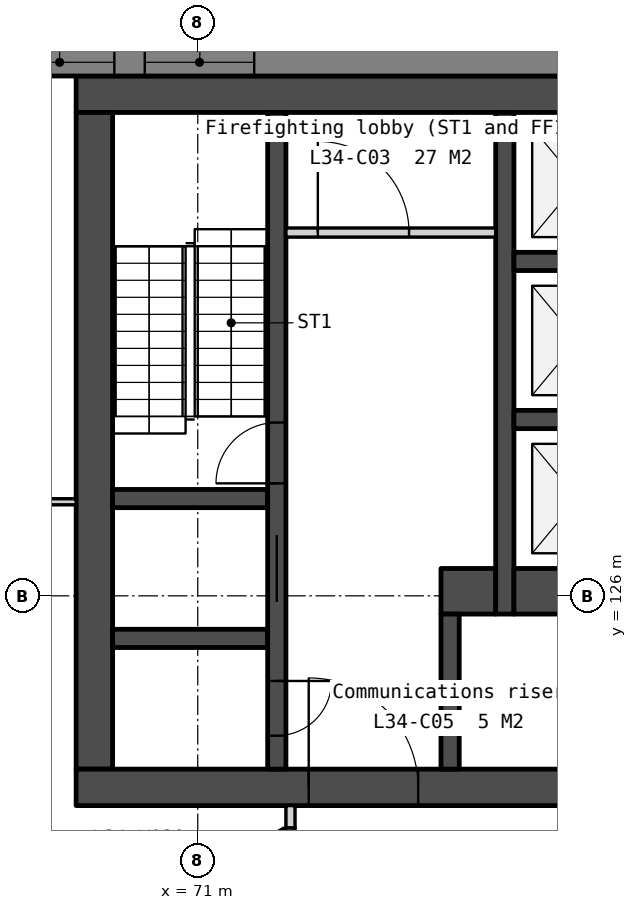
"""IFC4 building model, lengths in metres.
Left out: names, types, materials, properties, quantities, classifications, styles, units other than length and angle.
Written with IfcOpenShell. Run it as: python <this file> out.ifc"""

import sys

from ifc_helpers import new_model, si_unit, direction, frame, frame_2d, origin, place, context, subcontext, project, spatial, polyline, rectangle, outline, extrude, element, fill, save


model = new_model("IFC4")
c1 = context("Model", 3, precision=1e-05, world=origin(), true_north=direction((0.0, 1.0)))
c2 = subcontext(c1, "Body", "Model", "MODEL_VIEW")
j1 = project(units=[si_unit("LENGTHUNIT", "METRE"), si_unit("PLANEANGLEUNIT", "RADIAN")], contexts=[c1])
p1 = place(None, origin())
s1 = spatial("IfcSite", under=j1, at=p1, CompositionType="ELEMENT")
p2 = place(p1, origin())
s2 = spatial("IfcBuilding", under=s1, at=p2, CompositionType="ELEMENT")
p3 = place(p2, frame((0.0, 0.0, 136.4)))
s3 = spatial("IfcBuildingStorey", under=s2, at=p3, CompositionType="ELEMENT", Elevation=136.4)
p4 = place(p3, frame((69.0, 134.25, 0.0), z_axis=(0.0, 0.0, 1.0), x_axis=(1.0, 0.0, 0.0)))
e1 = element("IfcWall", 1, at=p4, inside=s3, PredefinedType="SOLIDWALL", context=c2, shape_type="SweptSolid", body=[
    extrude(rectangle(XDim=22.0, YDim=0.6, at=frame_2d((11.0, 0.0))), origin(), (0.0, 0.0, 1.0), 3.75),
])
p5 = place(p3, frame((69.3, 133.95, 0.0), z_axis=(0.0, 0.0, 1.0), x_axis=(0.0, -1.0, 0.0)))
e2 = element("IfcWall", 2, at=p5, inside=s3, PredefinedType="SOLIDWALL", context=c2, shape_type="SweptSolid", body=[
    extrude(rectangle(XDim=10.8, YDim=0.6, at=frame_2d((5.4, 0.0))), origin(), (0.0, 0.0, 1.0), 3.75),
])
p6 = place(p3, frame((69.0, 122.85, 0.0), z_axis=(0.0, 0.0, 1.0), x_axis=(1.0, 0.0, 0.0)))
e3 = element("IfcWall", 3, at=p6, inside=s3, PredefinedType="SOLIDWALL", context=c2, shape_type="SweptSolid", body=[
    extrude(rectangle(XDim=22.0, YDim=0.6, at=frame_2d((11.0, 0.0))), origin(), (0.0, 0.0, 1.0), 3.75),
])
p7 = place(p6, frame((16.375, 0.0, 0.0)))
e4 = element("IfcOpeningElement", 4, at=p7, cuts=e3, PredefinedType="OPENING", context=c2, shape_type="SweptSolid", body=[
    extrude(rectangle(XDim=1.8, YDim=2.1, at=frame_2d((0.9, 1.05))), frame((0.0, 0.31, 0.0), z_axis=(0.0, -1.0, 0.0), x_axis=(1.0, 0.0, 0.0)), (0.0, 0.0, 1.0), 0.62),
])
p8 = place(p6, frame((3.825, 0.0, 0.0)))
e5 = element("IfcOpeningElement", 5, at=p8, cuts=e3, PredefinedType="OPENING", context=c2, shape_type="SweptSolid", body=[
    extrude(rectangle(XDim=1.8, YDim=2.1, at=frame_2d((0.9, 1.05))), frame((0.0, 0.31, 0.0), z_axis=(0.0, -1.0, 0.0), x_axis=(1.0, 0.0, 0.0)), (0.0, 0.0, 1.0), 0.62),
])
p9 = place(p6, frame((12.85, 0.0, 0.0)))
e6 = element("IfcOpeningElement", 6, at=p9, cuts=e3, PredefinedType="OPENING", context=c2, shape_type="SweptSolid", body=[
    extrude(rectangle(XDim=1.5, YDim=2.1, at=frame_2d((0.75, 1.05))), frame((0.0, 0.31, 0.0), z_axis=(0.0, -1.0, 0.0), x_axis=(1.0, 0.0, 0.0)), (0.0, 0.0, 1.0), 0.62),
])
for number, where, z_axis, x_axis in (
    (7, (69.6, 127.6, 0.0), (0.0, 0.0, 1.0), (1.0, 0.0, 0.0)),
    (8, (69.6, 125.3, 0.0), (0.0, 0.0, 1.0), (1.0, 0.0, 0.0)),
):
    element("IfcWall", number, at=place(p3, frame(where, z_axis=z_axis, x_axis=x_axis)), inside=s3, PredefinedType="SOLIDWALL", context=c2, shape_type="SweptSolid", body=[
        extrude(rectangle(XDim=2.55, YDim=0.3, at=frame_2d((1.275, 0.0))), origin(), (0.0, 0.0, 1.0), 3.75),
    ])
p10 = place(p3, frame((72.3, 133.95, 0.0), z_axis=(0.0, 0.0, 1.0), x_axis=(0.0, -1.0, 0.0)))
e9 = element("IfcWall", 9, at=p10, inside=s3, PredefinedType="SOLIDWALL", context=c2, shape_type="SweptSolid", body=[
    extrude(rectangle(XDim=10.8, YDim=0.3, at=frame_2d((5.4, 0.0))), origin(), (0.0, 0.0, 1.0), 3.75),
])
p11 = place(p10, frame((6.95, 0.0, 0.0)))
e10 = element("IfcOpeningElement", 10, at=p11, cuts=e9, PredefinedType="OPENING", context=c2, shape_type="SweptSolid", body=[
    extrude(rectangle(XDim=1.1, YDim=2.1, at=frame_2d((0.55, 1.05))), frame((0.0, 0.16, 0.0), z_axis=(0.0, -1.0, 0.0), x_axis=(1.0, 0.0, 0.0)), (0.0, 0.0, 1.0), 0.32),
])
p12 = place(p10, frame((9.35, 0.0, 0.0)))
e11 = element("IfcOpeningElement", 11, at=p12, cuts=e9, PredefinedType="OPENING", context=c2, shape_type="SweptSolid", body=[
    extrude(rectangle(XDim=0.9, YDim=2.1, at=frame_2d((0.45, 1.05))), frame((0.0, 0.16, 0.0), z_axis=(0.0, -1.0, 0.0), x_axis=(1.0, 0.0, 0.0)), (0.0, 0.0, 1.0), 0.32),
])
p13 = place(p10, frame((5.1, 0.0, 0.0)))
e12 = element("IfcOpeningElement", 12, at=p13, cuts=e9, PredefinedType="OPENING", context=c2, shape_type="SweptSolid", body=[
    extrude(rectangle(XDim=1.0, YDim=2.1, at=frame_2d((0.5, 1.05))), frame((0.0, 0.16, 0.0), z_axis=(0.0, -1.0, 0.0), x_axis=(1.0, 0.0, 0.0)), (0.0, 0.0, 1.0), 0.32),
])
p14 = place(p3, frame((72.45, 131.975, 0.0), z_axis=(0.0, 0.0, 1.0), x_axis=(1.0, 0.0, 0.0)))
e13 = element("IfcWall", 13, at=p14, inside=s3, PredefinedType="PARTITIONING", context=c2, shape_type="SweptSolid", body=[
    extrude(rectangle(XDim=3.45, YDim=0.15, at=frame_2d((1.725, 0.0))), origin(), (0.0, 0.0, 1.0), 3.75),
])
p15 = place(p14, frame((0.525, 0.0, 0.0)))
e14 = element("IfcOpeningElement", 14, at=p15, cuts=e13, PredefinedType="OPENING", context=c2, shape_type="SweptSolid", body=[
    extrude(rectangle(XDim=1.5, YDim=2.1, at=frame_2d((0.75, 1.05))), frame((0.0, 0.085, 0.0), z_axis=(0.0, -1.0, 0.0), x_axis=(1.0, 0.0, 0.0)), (0.0, 0.0, 1.0), 0.17),
])
p16 = place(p3, frame((75.0, 126.075, 0.0), z_axis=(0.0, 0.0, 1.0), x_axis=(1.0, 0.0, 0.0)))
e15 = element("IfcWall", 15, at=p16, inside=s3, PredefinedType="SOLIDWALL", context=c2, shape_type="SweptSolid", body=[
    extrude(rectangle(XDim=0.9, YDim=0.75, at=frame_2d((0.45, 0.0))), origin(), (0.0, 0.0, 1.0), 3.75),
])
p17 = place(p3, frame((75.15, 125.7, 0.0), z_axis=(0.0, 0.0, 1.0), x_axis=(0.0, -1.0, 0.0)))
e16 = element("IfcWall", 16, at=p17, inside=s3, PredefinedType="SOLIDWALL", context=c2, shape_type="SweptSolid", body=[
    extrude(rectangle(XDim=2.55, YDim=0.3, at=frame_2d((1.275, 0.0))), origin(), (0.0, 0.0, 1.0), 3.75),
])
p18 = place(p3, frame((76.05, 133.95, 0.0), z_axis=(0.0, 0.0, 1.0), x_axis=(0.0, -1.0, 0.0)))
e17 = element("IfcWall", 17, at=p18, inside=s3, PredefinedType="SOLIDWALL", context=c2, shape_type="SweptSolid", body=[
    extrude(rectangle(XDim=8.25, YDim=0.3, at=frame_2d((4.125, 0.0))), origin(), (0.0, 0.0, 1.0), 3.75),
])
for number, where, z_axis, x_axis in (
    (18, (76.2, 131.5, 0.0), (0.0, 0.0, 1.0), (1.0, 0.0, 0.0)),
    (19, (76.2, 128.9, 0.0), (0.0, 0.0, 1.0), (1.0, 0.0, 0.0)),
):
    element("IfcWall", number, at=place(p3, frame(where, z_axis=z_axis, x_axis=x_axis)), inside=s3, PredefinedType="SOLIDWALL", context=c2, shape_type="SweptSolid", body=[
        extrude(rectangle(XDim=2.1, YDim=0.3, at=frame_2d((1.05, 0.0))), origin(), (0.0, 0.0, 1.0), 3.75),
    ])
p19 = place(p3, frame((76.2, 126.075, 0.0), z_axis=(0.0, 0.0, 1.0), x_axis=(1.0, 0.0, 0.0)))
e20 = element("IfcWall", 20, at=p19, inside=s3, PredefinedType="SOLIDWALL", context=c2, shape_type="SweptSolid", body=[
    extrude(rectangle(XDim=2.1, YDim=0.75, at=frame_2d((1.05, 0.0))), origin(), (0.0, 0.0, 1.0), 3.75),
])
p20 = place(p3, frame((100.243, 134.775, -0.15), z_axis=(0.0, 0.0, 1.0), x_axis=(-1.0, 0.0, 0.0)))
e21 = element("IfcWall", 21, at=p20, inside=s3, PredefinedType="SOLIDWALL", context=c2, shape_type="SweptSolid", body=[
    extrude(outline(polyline([(40.486, 0.0), (40.486, 3.9), (0.0, 3.9), (0.0, 0.0), (40.486, 0.0)])), frame((0.0, 0.225, 0.0), z_axis=(0.0, -1.0, 0.0), x_axis=(1.0, 0.0, 0.0)), (0.0, 0.0, 1.0), 0.45),
])
p21 = place(p20, frame((0.87, 0.0, 0.95)))
e22 = element("IfcOpeningElement", 22, at=p21, cuts=e21, PredefinedType="OPENING", context=c2, shape_type="SweptSolid", body=[
    extrude(rectangle(XDim=1.2, YDim=2.2, at=frame_2d((0.6, 1.1))), frame((0.0, 0.235, 0.0), z_axis=(0.0, -1.0, 0.0), x_axis=(1.0, 0.0, 0.0)), (0.0, 0.0, 1.0), 0.47),
])
p22 = place(p20, frame((8.072, 0.0, 0.95)))
e23 = element("IfcOpeningElement", 23, at=p22, cuts=e21, PredefinedType="OPENING", context=c2, shape_type="SweptSolid", body=[
    extrude(rectangle(XDim=1.8, YDim=2.2, at=frame_2d((0.9, 1.1))), frame((0.0, 0.235, 0.0), z_axis=(0.0, -1.0, 0.0), x_axis=(1.0, 0.0, 0.0)), (0.0, 0.0, 1.0), 0.47),
])
p23 = place(p20, frame((10.372, 0.0, 0.95)))
e24 = element("IfcOpeningElement", 24, at=p23, cuts=e21, PredefinedType="OPENING", context=c2, shape_type="SweptSolid", body=[
    extrude(rectangle(XDim=1.8, YDim=2.2, at=frame_2d((0.9, 1.1))), frame((0.0, 0.235, 0.0), z_axis=(0.0, -1.0, 0.0), x_axis=(1.0, 0.0, 0.0)), (0.0, 0.0, 1.0), 0.47),
])
p24 = place(p20, frame((18.193, 0.0, 0.95)))
e25 = element("IfcOpeningElement", 25, at=p24, cuts=e21, PredefinedType="OPENING", context=c2, shape_type="SweptSolid", body=[
    extrude(rectangle(XDim=1.8, YDim=2.2, at=frame_2d((0.9, 1.1))), frame((0.0, 0.235, 0.0), z_axis=(0.0, -1.0, 0.0), x_axis=(1.0, 0.0, 0.0)), (0.0, 0.0, 1.0), 0.47),
])
p25 = place(p20, frame((20.493, 0.0, 0.95)))
e26 = element("IfcOpeningElement", 26, at=p25, cuts=e21, PredefinedType="OPENING", context=c2, shape_type="SweptSolid", body=[
    extrude(rectangle(XDim=1.8, YDim=2.2, at=frame_2d((0.9, 1.1))), frame((0.0, 0.235, 0.0), z_axis=(0.0, -1.0, 0.0), x_axis=(1.0, 0.0, 0.0)), (0.0, 0.0, 1.0), 0.47),
])
p26 = place(p20, frame((28.315, 0.0, 0.95)))
e27 = element("IfcOpeningElement", 27, at=p26, cuts=e21, PredefinedType="OPENING", context=c2, shape_type="SweptSolid", body=[
    extrude(rectangle(XDim=1.8, YDim=2.2, at=frame_2d((0.9, 1.1))), frame((0.0, 0.235, 0.0), z_axis=(0.0, -1.0, 0.0), x_axis=(1.0, 0.0, 0.0)), (0.0, 0.0, 1.0), 0.47),
])
p27 = place(p20, frame((30.615, 0.0, 0.95)))
e28 = element("IfcOpeningElement", 28, at=p27, cuts=e21, PredefinedType="OPENING", context=c2, shape_type="SweptSolid", body=[
    extrude(rectangle(XDim=1.8, YDim=2.2, at=frame_2d((0.9, 1.1))), frame((0.0, 0.235, 0.0), z_axis=(0.0, -1.0, 0.0), x_axis=(1.0, 0.0, 0.0)), (0.0, 0.0, 1.0), 0.47),
])
p28 = place(p20, frame((38.417, 0.0, 0.95)))
e29 = element("IfcOpeningElement", 29, at=p28, cuts=e21, PredefinedType="OPENING", context=c2, shape_type="SweptSolid", body=[
    extrude(rectangle(XDim=1.2, YDim=2.2, at=frame_2d((0.6, 1.1))), frame((0.0, 0.235, 0.0), z_axis=(0.0, -1.0, 0.0), x_axis=(1.0, 0.0, 0.0)), (0.0, 0.0, 1.0), 0.47),
])
p29 = place(p3, frame((57.652, 131.129, -0.15), z_axis=(0.0, 0.0, 1.0), x_axis=(0.499997369791, -0.866026922331, 0.0)))
e30 = element("IfcWall", 30, at=p29, inside=s3, PredefinedType="SOLIDWALL", context=c2, shape_type="SweptSolid", body=[
    extrude(outline(polyline([(40.486, 0.0), (40.486, 3.9), (0.0, 3.9), (0.0, 0.0), (40.486, 0.0)])), frame((0.0, 0.225, 0.0), z_axis=(0.0, -1.0, 0.0), x_axis=(1.0, 0.0, 0.0)), (0.0, 0.0, 1.0), 0.45),
])
p30 = place(p29, frame((0.87, 0.0, 0.95)))
e31 = element("IfcOpeningElement", 31, at=p30, cuts=e30, PredefinedType="OPENING", context=c2, shape_type="SweptSolid", body=[
    extrude(rectangle(XDim=1.2, YDim=2.2, at=frame_2d((0.6, 1.1))), frame((0.0, 0.235, 0.0), z_axis=(0.0, -1.0, 0.0), x_axis=(1.0, 0.0, 0.0)), (0.0, 0.0, 1.0), 0.47),
])
p31 = place(p29, frame((8.072, 0.0, 0.95)))
e32 = element("IfcOpeningElement", 32, at=p31, cuts=e30, PredefinedType="OPENING", context=c2, shape_type="SweptSolid", body=[
    extrude(rectangle(XDim=1.8, YDim=2.2, at=frame_2d((0.9, 1.1))), frame((0.0, 0.235, 0.0), z_axis=(0.0, -1.0, 0.0), x_axis=(1.0, 0.0, 0.0)), (0.0, 0.0, 1.0), 0.47),
])
p32 = place(p29, frame((10.372, 0.0, 0.95)))
e33 = element("IfcOpeningElement", 33, at=p32, cuts=e30, PredefinedType="OPENING", context=c2, shape_type="SweptSolid", body=[
    extrude(rectangle(XDim=1.8, YDim=2.2, at=frame_2d((0.9, 1.1))), frame((0.0, 0.235, 0.0), z_axis=(0.0, -1.0, 0.0), x_axis=(1.0, 0.0, 0.0)), (0.0, 0.0, 1.0), 0.47),
])
p33 = place(p29, frame((18.193, 0.0, 0.95)))
e34 = element("IfcOpeningElement", 34, at=p33, cuts=e30, PredefinedType="OPENING", context=c2, shape_type="SweptSolid", body=[
    extrude(rectangle(XDim=1.8, YDim=2.2, at=frame_2d((0.9, 1.1))), frame((0.0, 0.235, 0.0), z_axis=(0.0, -1.0, 0.0), x_axis=(1.0, 0.0, 0.0)), (0.0, 0.0, 1.0), 0.47),
])
p34 = place(p29, frame((20.493, 0.0, 0.95)))
e35 = element("IfcOpeningElement", 35, at=p34, cuts=e30, PredefinedType="OPENING", context=c2, shape_type="SweptSolid", body=[
    extrude(rectangle(XDim=1.8, YDim=2.2, at=frame_2d((0.9, 1.1))), frame((0.0, 0.235, 0.0), z_axis=(0.0, -1.0, 0.0), x_axis=(1.0, 0.0, 0.0)), (0.0, 0.0, 1.0), 0.47),
])
p35 = place(p29, frame((28.315, 0.0, 0.95)))
e36 = element("IfcOpeningElement", 36, at=p35, cuts=e30, PredefinedType="OPENING", context=c2, shape_type="SweptSolid", body=[
    extrude(rectangle(XDim=1.8, YDim=2.2, at=frame_2d((0.9, 1.1))), frame((0.0, 0.235, 0.0), z_axis=(0.0, -1.0, 0.0), x_axis=(1.0, 0.0, 0.0)), (0.0, 0.0, 1.0), 0.47),
])
p36 = place(p29, frame((30.615, 0.0, 0.95)))
e37 = element("IfcOpeningElement", 37, at=p36, cuts=e30, PredefinedType="OPENING", context=c2, shape_type="SweptSolid", body=[
    extrude(rectangle(XDim=1.8, YDim=2.2, at=frame_2d((0.9, 1.1))), frame((0.0, 0.235, 0.0), z_axis=(0.0, -1.0, 0.0), x_axis=(1.0, 0.0, 0.0)), (0.0, 0.0, 1.0), 0.47),
])
p37 = place(p29, frame((38.417, 0.0, 0.95)))
e38 = element("IfcOpeningElement", 38, at=p37, cuts=e30, PredefinedType="OPENING", context=c2, shape_type="SweptSolid", body=[
    extrude(rectangle(XDim=1.2, YDim=2.2, at=frame_2d((0.6, 1.1))), frame((0.0, 0.235, 0.0), z_axis=(0.0, -1.0, 0.0), x_axis=(1.0, 0.0, 0.0)), (0.0, 0.0, 1.0), 0.47),
])
p38 = place(p3, frame((65.438, 118.093, 0.0), z_axis=(0.0, 0.0, 1.0), x_axis=(0.866029768103, 0.499992440702, 0.0)))
e39 = element("IfcWall", 39, at=p38, inside=s3, PredefinedType="PARTITIONING", context=c2, shape_type="SweptSolid", body=[
    extrude(rectangle(XDim=8.089, YDim=0.1, at=frame_2d((4.044, 0.0))), origin(), (0.0, 0.0, 1.0), 3.75),
])
p39 = place(p38, frame((3.594, 0.0, 0.0)))
e40 = element("IfcOpeningElement", 40, at=p39, cuts=e39, PredefinedType="OPENING", context=c2, shape_type="SweptSolid", body=[
    extrude(rectangle(XDim=0.9, YDim=2.1, at=frame_2d((0.45, 1.05))), frame((0.0, 0.06, 0.0), z_axis=(0.0, -1.0, 0.0), x_axis=(1.0, 0.0, 0.0)), (0.0, 0.0, 1.0), 0.12),
])
p40 = place(p3, frame((72.525, 120.05, 0.0), z_axis=(0.0, 0.0, 1.0), x_axis=(0.0, 1.0, 0.0)))
e41 = element("IfcWall", 41, at=p40, inside=s3, PredefinedType="PARTITIONING", context=c2, shape_type="SweptSolid", body=[
    extrude(rectangle(XDim=2.135, YDim=0.15, at=frame_2d((1.067, 0.0))), origin(), (0.0, 0.0, 1.0), 3.75),
])
p41 = place(p40, frame((0.567, 0.0, 0.0)))
e42 = element("IfcOpeningElement", 42, at=p41, cuts=e41, PredefinedType="OPENING", context=c2, shape_type="SweptSolid", body=[
    extrude(rectangle(XDim=1.0, YDim=2.1, at=frame_2d((0.5, 1.05))), frame((0.0, 0.085, 0.0), z_axis=(0.0, -1.0, 0.0), x_axis=(1.0, 0.0, 0.0)), (0.0, 0.0, 1.0), 0.17),
])
p42 = place(p3, frame((72.525, 122.185, 0.0), z_axis=(0.0, 0.0, 1.0), x_axis=(0.0, 1.0, 0.0)))
e43 = element("IfcWall", 43, at=p42, inside=s3, PredefinedType="PARTITIONING", context=c2, shape_type="SweptSolid", body=[
    extrude(rectangle(XDim=0.365, YDim=0.15, at=frame_2d((0.183, 0.0))), origin(), (0.0, 0.0, 1.0), 3.75),
])
p43 = place(p3, frame((67.053, 127.547, 0.0), z_axis=(0.0, 0.0, 1.0), x_axis=(0.999999992138, 0.000125391849, 0.0)))
e44 = element("IfcWall", 44, at=p43, inside=s3, PredefinedType="PARTITIONING", context=c2, shape_type="SweptSolid", body=[
    extrude(rectangle(XDim=1.947, YDim=0.1, at=frame_2d((0.974, 0.0))), origin(), (0.0, 0.0, 1.0), 3.75),
])
p44 = place(p43, frame((0.523, 0.0, 0.0)))
e45 = element("IfcOpeningElement", 45, at=p44, cuts=e44, PredefinedType="OPENING", context=c2, shape_type="SweptSolid", body=[
    extrude(rectangle(XDim=0.9, YDim=2.1, at=frame_2d((0.45, 1.05))), frame((0.0, 0.06, 0.0), z_axis=(0.0, -1.0, 0.0), x_axis=(1.0, 0.0, 0.0)), (0.0, 0.0, 1.0), 0.12),
])
p45 = place(p11, origin())
e46 = element("IfcDoor", 46, at=p45, inside=s3, OperationType="SLIDING_TO_LEFT", PredefinedType="DOOR", context=c2, shape_type="SweptSolid", body=[
    extrude(rectangle(XDim=1.1, YDim=2.1, at=frame_2d((0.55, 1.05))), frame((0.0, 0.025, 0.0), z_axis=(0.0, -1.0, 0.0), x_axis=(1.0, 0.0, 0.0)), (0.0, 0.0, 1.0), 0.05),
])
fill(e10, e46)
p46 = place(p8, origin())
e47 = element("IfcDoor", 47, at=p46, inside=s3, OperationType="DOUBLE_DOOR_DOUBLE_SWING", PredefinedType="DOOR", context=c2, shape_type="SweptSolid", body=[
    extrude(rectangle(XDim=1.8, YDim=2.1, at=frame_2d((0.9, 1.05))), frame((0.0, 0.025, 0.0), z_axis=(0.0, -1.0, 0.0), x_axis=(1.0, 0.0, 0.0)), (0.0, 0.0, 1.0), 0.05),
])
fill(e5, e47)
p47 = place(p15, origin())
e48 = element("IfcDoor", 48, at=p47, inside=s3, OperationType="DOUBLE_DOOR_DOUBLE_SWING", PredefinedType="DOOR", context=c2, shape_type="SweptSolid", body=[
    extrude(rectangle(XDim=1.5, YDim=2.1, at=frame_2d((0.75, 1.05))), frame((0.0, 0.025, 0.0), z_axis=(0.0, -1.0, 0.0), x_axis=(1.0, 0.0, 0.0)), (0.0, 0.0, 1.0), 0.05),
])
fill(e14, e48)
p48 = place(p12, origin())
e49 = element("IfcDoor", 49, at=p48, inside=s3, OperationType="SINGLE_SWING_LEFT", PredefinedType="DOOR", context=c2, shape_type="SweptSolid", body=[
    extrude(rectangle(XDim=0.9, YDim=2.1, at=frame_2d((0.45, 1.05))), frame((0.0, 0.025, 0.0), z_axis=(0.0, -1.0, 0.0), x_axis=(1.0, 0.0, 0.0)), (0.0, 0.0, 1.0), 0.05),
])
fill(e11, e49)
p49 = place(p13, origin())
e50 = element("IfcDoor", 50, at=p49, inside=s3, OperationType="SINGLE_SWING_RIGHT", PredefinedType="DOOR", context=c2, shape_type="SweptSolid", body=[
    extrude(rectangle(XDim=1.0, YDim=2.1, at=frame_2d((0.5, 1.05))), frame((0.0, 0.025, 0.0), z_axis=(0.0, -1.0, 0.0), x_axis=(1.0, 0.0, 0.0)), (0.0, 0.0, 1.0), 0.05),
])
fill(e12, e50)
p50 = place(p26, origin())
e51 = element("IfcWindow", 51, at=p50, inside=s3, PartitioningType="SINGLE_PANEL", PredefinedType="WINDOW", context=c2, shape_type="SweptSolid", body=[
    extrude(rectangle(XDim=1.8, YDim=2.2, at=frame_2d((0.9, 1.1))), frame((0.0, 0.03, 0.0), z_axis=(0.0, -1.0, 0.0), x_axis=(1.0, 0.0, 0.0)), (0.0, 0.0, 1.0), 0.06),
])
fill(e27, e51)
p51 = place(p27, origin())
e52 = element("IfcWindow", 52, at=p51, inside=s3, PartitioningType="SINGLE_PANEL", PredefinedType="WINDOW", context=c2, shape_type="SweptSolid", body=[
    extrude(rectangle(XDim=1.8, YDim=2.2, at=frame_2d((0.9, 1.1))), frame((0.0, 0.03, 0.0), z_axis=(0.0, -1.0, 0.0), x_axis=(1.0, 0.0, 0.0)), (0.0, 0.0, 1.0), 0.06),
])
fill(e28, e52)
save(model, sys.argv[1])
